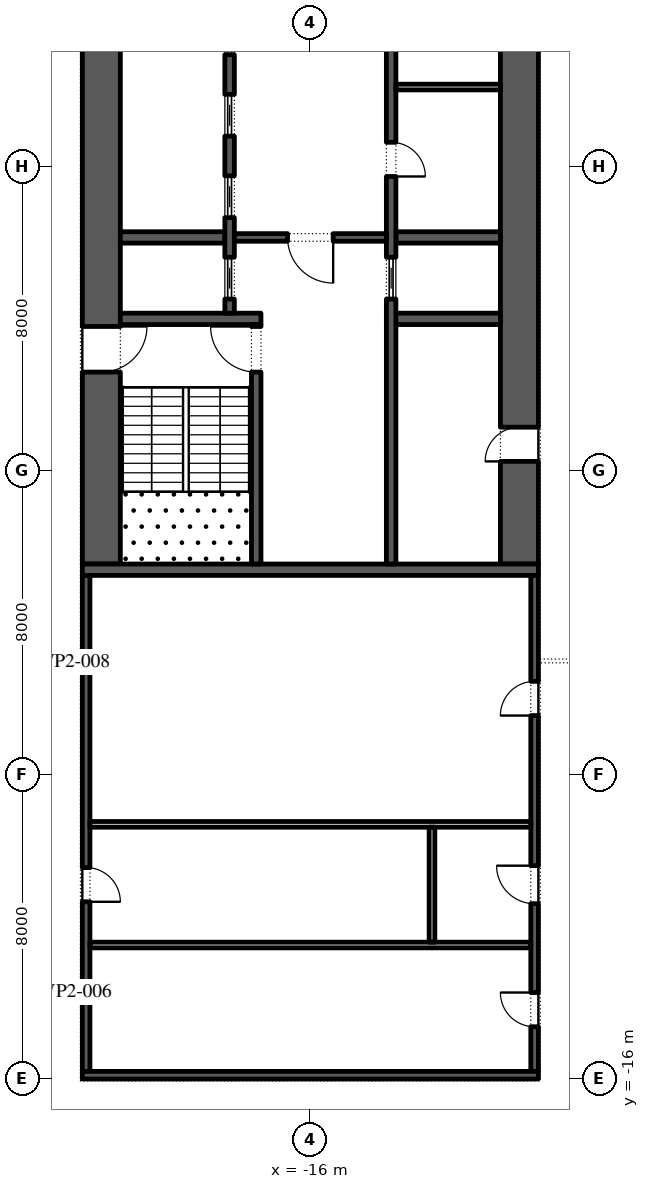
"""IFC4 building model, lengths in metres.
Left out: names, types, materials, properties, quantities, classifications, styles, units other than length and angle.
Written with IfcOpenShell. Run it as: python <this file> out.ifc"""

import sys

from ifc_helpers import new_model, si_unit, direction, frame, frame_2d, origin, place, context, subcontext, project, spatial, rectangle, extrude, element, fill, save


model = new_model("IFC4")
c1 = context("Model", 3, precision=1e-05, world=origin(), true_north=direction((0.0, 1.0)))
c2 = subcontext(c1, "Body", "Model", "MODEL_VIEW")
j1 = project(units=[si_unit("LENGTHUNIT", "METRE"), si_unit("PLANEANGLEUNIT", "RADIAN")], contexts=[c1])
p1 = place(None, origin())
s1 = spatial("IfcSite", under=j1, at=p1, CompositionType="ELEMENT")
p2 = place(p1, origin())
s2 = spatial("IfcBuilding", under=s1, at=p2, CompositionType="ELEMENT")
p3 = place(p2, frame((0.0, 0.0, 60.6)))
s3 = spatial("IfcBuildingStorey", under=s2, at=p3, CompositionType="ELEMENT", Elevation=60.6)
p4 = place(p3, frame((-21.5, -2.45, 0.0), z_axis=(0.0, 0.0, 1.0), x_axis=(0.0, 1.0, 0.0)))
e1 = element("IfcWall", 1, at=p4, inside=s3, PredefinedType="SHEAR", context=c2, shape_type="SweptSolid", body=[
    extrude(rectangle(XDim=27.9, YDim=1.0, at=frame_2d((13.95, 0.0))), origin(), (0.0, 0.0, 1.0), 4.0),
])
p5 = place(p4, frame((5.05, 0.0, 0.0)))
e2 = element("IfcOpeningElement", 2, at=p5, cuts=e1, PredefinedType="OPENING", context=c2, shape_type="SweptSolid", body=[
    extrude(rectangle(XDim=1.2, YDim=2.1, at=frame_2d((0.6, 1.05))), frame((0.0, 0.51, 0.0), z_axis=(0.0, -1.0, 0.0), x_axis=(1.0, 0.0, 0.0)), (0.0, 0.0, 1.0), 1.02),
])
p6 = place(p4, frame((21.65, 0.0, 0.0)))
e3 = element("IfcOpeningElement", 3, at=p6, cuts=e1, PredefinedType="OPENING", context=c2, shape_type="SweptSolid", body=[
    extrude(rectangle(XDim=1.2, YDim=2.1, at=frame_2d((0.6, 1.05))), frame((0.0, 0.51, 0.0), z_axis=(0.0, -1.0, 0.0), x_axis=(1.0, 0.0, 0.0)), (0.0, 0.0, 1.0), 1.02),
])
p7 = place(p3, frame((-10.5, -2.45, 0.0), z_axis=(0.0, 0.0, 1.0), x_axis=(0.0, 1.0, 0.0)))
e4 = element("IfcWall", 4, at=p7, inside=s3, PredefinedType="SHEAR", context=c2, shape_type="SweptSolid", body=[
    extrude(rectangle(XDim=27.9, YDim=1.0, at=frame_2d((13.95, 0.0))), origin(), (0.0, 0.0, 1.0), 4.0),
])
p8 = place(p7, frame((23.65, 0.0, 0.0)))
e5 = element("IfcOpeningElement", 5, at=p8, cuts=e4, PredefinedType="OPENING", context=c2, shape_type="SweptSolid", body=[
    extrude(rectangle(XDim=2.4, YDim=2.1, at=frame_2d((1.2, 1.05))), frame((0.0, 0.51, 0.0), z_axis=(0.0, -1.0, 0.0), x_axis=(1.0, 0.0, 0.0)), (0.0, 0.0, 1.0), 1.02),
])
p9 = place(p7, frame((2.7, 0.0, 0.0)))
e6 = element("IfcOpeningElement", 6, at=p9, cuts=e4, PredefinedType="OPENING", context=c2, shape_type="SweptSolid", body=[
    extrude(rectangle(XDim=0.9, YDim=2.1, at=frame_2d((0.45, 1.05))), frame((0.0, 0.51, 0.0), z_axis=(0.0, -1.0, 0.0), x_axis=(1.0, 0.0, 0.0)), (0.0, 0.0, 1.0), 1.02),
])
p10 = place(p3, frame((-22.0, -2.6, 0.0), z_axis=(0.0, 0.0, 1.0), x_axis=(1.0, 0.0, 0.0)))
e7 = element("IfcWall", 7, at=p10, inside=s3, PredefinedType="SHEAR", context=c2, shape_type="SweptSolid", body=[
    extrude(rectangle(XDim=12.0, YDim=0.3, at=frame_2d((6.0, 0.0))), origin(), (0.0, 0.0, 1.0), 4.0),
])
p11 = place(p3, frame((-21.0, 4.0, 0.0), z_axis=(0.0, 0.0, 1.0), x_axis=(1.0, 0.0, 0.0)))
e8 = element("IfcWall", 8, at=p11, inside=s3, PredefinedType="SHEAR", context=c2, shape_type="SweptSolid", body=[
    extrude(rectangle(XDim=3.7, YDim=0.3, at=frame_2d((1.85, 0.0))), origin(), (0.0, 0.0, 1.0), 4.0),
])
p12 = place(p3, frame((-17.425, -2.45, 0.0), z_axis=(0.0, 0.0, 1.0), x_axis=(0.0, 1.0, 0.0)))
e9 = element("IfcWall", 9, at=p12, inside=s3, PredefinedType="SHEAR", context=c2, shape_type="SweptSolid", body=[
    extrude(rectangle(XDim=6.3, YDim=0.25, at=frame_2d((3.15, 0.0))), origin(), (0.0, 0.0, 1.0), 4.0),
])
p13 = place(p12, frame((5.05, 0.0, 0.0)))
e10 = element("IfcOpeningElement", 10, at=p13, cuts=e9, PredefinedType="OPENING", context=c2, shape_type="SweptSolid", body=[
    extrude(rectangle(XDim=1.2, YDim=2.1, at=frame_2d((0.6, 1.05))), frame((0.0, 0.135, 0.0), z_axis=(0.0, -1.0, 0.0), x_axis=(1.0, 0.0, 0.0)), (0.0, 0.0, 1.0), 0.27),
])
p14 = place(p3, frame((-21.0, 6.143, 0.0), z_axis=(0.0, 0.0, 1.0), x_axis=(1.0, 0.0, 0.0)))
e11 = element("IfcWall", 11, at=p14, inside=s3, PredefinedType="SHEAR", context=c2, shape_type="SweptSolid", body=[
    extrude(rectangle(XDim=2.75, YDim=0.3, at=frame_2d((1.375, 0.0))), origin(), (0.0, 0.0, 1.0), 4.0),
])
p15 = place(p3, frame((-18.125, 4.15, 0.0), z_axis=(0.0, 0.0, 1.0), x_axis=(0.0, 1.0, 0.0)))
e12 = element("IfcWall", 12, at=p15, inside=s3, PredefinedType="SHEAR", context=c2, shape_type="SweptSolid", body=[
    extrude(rectangle(XDim=14.7, YDim=0.25, at=frame_2d((7.35, 0.0))), origin(), (0.0, 0.0, 1.0), 4.0),
])
p16 = place(p15, frame((0.371, 0.0, 0.0)))
e13 = element("IfcOpeningElement", 13, at=p16, cuts=e12, PredefinedType="OPENING", context=c2, shape_type="SweptSolid", body=[
    extrude(rectangle(XDim=1.1, YDim=2.1, at=frame_2d((0.55, 1.05))), frame((0.0, 0.135, 0.0), z_axis=(0.0, -1.0, 0.0), x_axis=(1.0, 0.0, 0.0)), (0.0, 0.0, 1.0), 0.27),
])
p17 = place(p15, frame((2.514, 0.0, 0.0)))
e14 = element("IfcOpeningElement", 14, at=p17, cuts=e12, PredefinedType="OPENING", context=c2, shape_type="SweptSolid", body=[
    extrude(rectangle(XDim=1.1, YDim=2.1, at=frame_2d((0.55, 1.05))), frame((0.0, 0.135, 0.0), z_axis=(0.0, -1.0, 0.0), x_axis=(1.0, 0.0, 0.0)), (0.0, 0.0, 1.0), 0.27),
])
p18 = place(p15, frame((4.657, 0.0, 0.0)))
e15 = element("IfcOpeningElement", 15, at=p18, cuts=e12, PredefinedType="OPENING", context=c2, shape_type="SweptSolid", body=[
    extrude(rectangle(XDim=1.1, YDim=2.1, at=frame_2d((0.55, 1.05))), frame((0.0, 0.135, 0.0), z_axis=(0.0, -1.0, 0.0), x_axis=(1.0, 0.0, 0.0)), (0.0, 0.0, 1.0), 0.27),
])
p19 = place(p15, frame((6.8, 0.0, 0.0)))
e16 = element("IfcOpeningElement", 16, at=p19, cuts=e12, PredefinedType="OPENING", context=c2, shape_type="SweptSolid", body=[
    extrude(rectangle(XDim=1.1, YDim=2.1, at=frame_2d((0.55, 1.05))), frame((0.0, 0.135, 0.0), z_axis=(0.0, -1.0, 0.0), x_axis=(1.0, 0.0, 0.0)), (0.0, 0.0, 1.0), 0.27),
])
p20 = place(p15, frame((8.943, 0.0, 0.0)))
e17 = element("IfcOpeningElement", 17, at=p20, cuts=e12, PredefinedType="OPENING", context=c2, shape_type="SweptSolid", body=[
    extrude(rectangle(XDim=1.1, YDim=2.1, at=frame_2d((0.55, 1.05))), frame((0.0, 0.135, 0.0), z_axis=(0.0, -1.0, 0.0), x_axis=(1.0, 0.0, 0.0)), (0.0, 0.0, 1.0), 0.27),
])
p21 = place(p15, frame((11.086, 0.0, 0.0)))
e18 = element("IfcOpeningElement", 18, at=p21, cuts=e12, PredefinedType="OPENING", context=c2, shape_type="SweptSolid", body=[
    extrude(rectangle(XDim=1.1, YDim=2.1, at=frame_2d((0.55, 1.05))), frame((0.0, 0.135, 0.0), z_axis=(0.0, -1.0, 0.0), x_axis=(1.0, 0.0, 0.0)), (0.0, 0.0, 1.0), 0.27),
])
p22 = place(p15, frame((13.229, 0.0, 0.0)))
e19 = element("IfcOpeningElement", 19, at=p22, cuts=e12, PredefinedType="OPENING", context=c2, shape_type="SweptSolid", body=[
    extrude(rectangle(XDim=1.1, YDim=2.1, at=frame_2d((0.55, 1.05))), frame((0.0, 0.135, 0.0), z_axis=(0.0, -1.0, 0.0), x_axis=(1.0, 0.0, 0.0)), (0.0, 0.0, 1.0), 0.27),
])
p23 = place(p3, frame((-14.0, 4.0, 0.0), z_axis=(0.0, 0.0, 1.0), x_axis=(1.0, 0.0, 0.0)))
e20 = element("IfcWall", 20, at=p23, inside=s3, PredefinedType="SHEAR", context=c2, shape_type="SweptSolid", body=[
    extrude(rectangle(XDim=3.0, YDim=0.3, at=frame_2d((1.5, 0.0))), origin(), (0.0, 0.0, 1.0), 4.0),
])
p24 = place(p3, frame((-13.75, 6.143, 0.0), z_axis=(0.0, 0.0, 1.0), x_axis=(1.0, 0.0, 0.0)))
e21 = element("IfcWall", 21, at=p24, inside=s3, PredefinedType="SHEAR", context=c2, shape_type="SweptSolid", body=[
    extrude(rectangle(XDim=2.75, YDim=0.3, at=frame_2d((1.375, 0.0))), origin(), (0.0, 0.0, 1.0), 4.0),
])
p25 = place(p3, frame((-13.875, -2.45, 0.0), z_axis=(0.0, 0.0, 1.0), x_axis=(0.0, 1.0, 0.0)))
e22 = element("IfcWall", 22, at=p25, inside=s3, PredefinedType="SHEAR", context=c2, shape_type="SweptSolid", body=[
    extrude(rectangle(XDim=21.3, YDim=0.25, at=frame_2d((10.65, 0.0))), origin(), (0.0, 0.0, 1.0), 4.0),
])
p26 = place(p25, frame((10.196, 0.0, 0.0)))
e23 = element("IfcOpeningElement", 23, at=p26, cuts=e22, PredefinedType="OPENING", context=c2, shape_type="SweptSolid", body=[
    extrude(rectangle(XDim=0.9, YDim=2.1, at=frame_2d((0.45, 1.05))), frame((0.0, 0.135, 0.0), z_axis=(0.0, -1.0, 0.0), x_axis=(1.0, 0.0, 0.0)), (0.0, 0.0, 1.0), 0.27),
])
p27 = place(p25, frame((16.475, 0.0, 0.0)))
e24 = element("IfcOpeningElement", 24, at=p27, cuts=e22, PredefinedType="OPENING", context=c2, shape_type="SweptSolid", body=[
    extrude(rectangle(XDim=0.9, YDim=2.1, at=frame_2d((0.45, 1.05))), frame((0.0, 0.135, 0.0), z_axis=(0.0, -1.0, 0.0), x_axis=(1.0, 0.0, 0.0)), (0.0, 0.0, 1.0), 0.27),
])
p28 = place(p25, frame((6.971, 0.0, 0.0)))
e25 = element("IfcOpeningElement", 25, at=p28, cuts=e22, PredefinedType="OPENING", context=c2, shape_type="SweptSolid", body=[
    extrude(rectangle(XDim=1.1, YDim=2.1, at=frame_2d((0.55, 1.05))), frame((0.0, 0.135, 0.0), z_axis=(0.0, -1.0, 0.0), x_axis=(1.0, 0.0, 0.0)), (0.0, 0.0, 1.0), 0.27),
])
p29 = place(p3, frame((-13.75, 10.1, 0.0), z_axis=(0.0, 0.0, 1.0), x_axis=(1.0, 0.0, 0.0)))
e26 = element("IfcWall", 26, at=p29, inside=s3, PredefinedType="PARTITIONING", context=c2, shape_type="SweptSolid", body=[
    extrude(rectangle(XDim=2.75, YDim=0.15, at=frame_2d((1.375, 0.0))), origin(), (0.0, 0.0, 1.0), 4.0),
])
p30 = place(p3, frame((-18.0, 6.143, 0.0), z_axis=(0.0, 0.0, 1.0), x_axis=(1.0, 0.0, 0.0)))
e27 = element("IfcWall", 27, at=p30, inside=s3, PredefinedType="SHEAR", context=c2, shape_type="SweptSolid", body=[
    extrude(rectangle(XDim=4.0, YDim=0.2, at=frame_2d((2.0, 0.0))), origin(), (0.0, 0.0, 1.0), 4.0),
])
p31 = place(p30, frame((1.4, 0.0, 0.0)))
e28 = element("IfcOpeningElement", 28, at=p31, cuts=e27, PredefinedType="OPENING", context=c2, shape_type="SweptSolid", body=[
    extrude(rectangle(XDim=1.2, YDim=2.1, at=frame_2d((0.6, 1.05))), frame((0.0, 0.11, 0.0), z_axis=(0.0, -1.0, 0.0), x_axis=(1.0, 0.0, 0.0)), (0.0, 0.0, 1.0), 0.22),
])
p32 = place(p3, frame((-21.9, -15.8, 0.0), z_axis=(0.0, 0.0, 1.0), x_axis=(0.0, 1.0, 0.0)))
e29 = element("IfcWall", 29, at=p32, inside=s3, PredefinedType="SHEAR", context=c2, shape_type="SweptSolid", body=[
    extrude(rectangle(XDim=13.05, YDim=0.2, at=frame_2d((6.525, 0.0))), origin(), (0.0, 0.0, 1.0), 4.0),
])
p33 = place(p32, frame((4.462, 0.0, 0.0)))
e30 = element("IfcOpeningElement", 30, at=p33, cuts=e29, PredefinedType="OPENING", context=c2, shape_type="SweptSolid", body=[
    extrude(rectangle(XDim=0.9, YDim=2.1, at=frame_2d((0.45, 1.05))), frame((0.0, 0.11, 0.0), z_axis=(0.0, -1.0, 0.0), x_axis=(1.0, 0.0, 0.0)), (0.0, 0.0, 1.0), 0.22),
])
p34 = place(p3, frame((-10.1, -15.8, 0.0), z_axis=(0.0, 0.0, 1.0), x_axis=(0.0, 1.0, 0.0)))
e31 = element("IfcWall", 31, at=p34, inside=s3, PredefinedType="SHEAR", context=c2, shape_type="SweptSolid", body=[
    extrude(rectangle(XDim=13.05, YDim=0.2, at=frame_2d((6.525, 0.0))), origin(), (0.0, 0.0, 1.0), 4.0),
])
p35 = place(p34, frame((1.175, 0.0, 0.0)))
e32 = element("IfcOpeningElement", 32, at=p35, cuts=e31, PredefinedType="OPENING", context=c2, shape_type="SweptSolid", body=[
    extrude(rectangle(XDim=0.9, YDim=2.1, at=frame_2d((0.45, 1.05))), frame((0.0, 0.11, 0.0), z_axis=(0.0, -1.0, 0.0), x_axis=(1.0, 0.0, 0.0)), (0.0, 0.0, 1.0), 0.22),
])
p36 = place(p34, frame((4.413, 0.0, 0.0)))
e33 = element("IfcOpeningElement", 33, at=p36, cuts=e31, PredefinedType="OPENING", context=c2, shape_type="SweptSolid", body=[
    extrude(rectangle(XDim=1.0, YDim=2.1, at=frame_2d((0.5, 1.05))), frame((0.0, 0.11, 0.0), z_axis=(0.0, -1.0, 0.0), x_axis=(1.0, 0.0, 0.0)), (0.0, 0.0, 1.0), 0.22),
])
p37 = place(p34, frame((9.363, 0.0, 0.0)))
e34 = element("IfcOpeningElement", 34, at=p37, cuts=e31, PredefinedType="OPENING", context=c2, shape_type="SweptSolid", body=[
    extrude(rectangle(XDim=0.9, YDim=2.1, at=frame_2d((0.45, 1.05))), frame((0.0, 0.11, 0.0), z_axis=(0.0, -1.0, 0.0), x_axis=(1.0, 0.0, 0.0)), (0.0, 0.0, 1.0), 0.22),
])
p38 = place(p3, frame((-22.0, -15.9, 0.0), z_axis=(0.0, 0.0, 1.0), x_axis=(1.0, 0.0, 0.0)))
e35 = element("IfcWall", 35, at=p38, inside=s3, PredefinedType="SHEAR", context=c2, shape_type="SweptSolid", body=[
    extrude(rectangle(XDim=12.0, YDim=0.2, at=frame_2d((6.0, 0.0))), origin(), (0.0, 0.0, 1.0), 4.0),
])
for number, where, z_axis, x_axis in (
    (36, (-21.8, -9.3, 0.0), (0.0, 0.0, 1.0), (1.0, 0.0, 0.0)),
    (37, (-21.8, -12.475, 0.0), (0.0, 0.0, 1.0), (1.0, 0.0, 0.0)),
):
    element("IfcWall", number, at=place(p3, frame(where, z_axis=z_axis, x_axis=x_axis)), inside=s3, PredefinedType="PARTITIONING", context=c2, shape_type="SweptSolid", body=[
        extrude(rectangle(XDim=11.6, YDim=0.15, at=frame_2d((5.8, 0.0))), origin(), (0.0, 0.0, 1.0), 4.0),
    ])
p39 = place(p3, frame((-12.8, -12.4, 0.0), z_axis=(0.0, 0.0, 1.0), x_axis=(0.0, 1.0, 0.0)))
e38 = element("IfcWall", 38, at=p39, inside=s3, PredefinedType="PARTITIONING", context=c2, shape_type="SweptSolid", body=[
    extrude(rectangle(XDim=3.025, YDim=0.15, at=frame_2d((1.512, 0.0))), origin(), (0.0, 0.0, 1.0), 4.0),
])
p40 = place(p16, origin())
e39 = element("IfcDoor", 39, at=p40, inside=s3, OperationType="SLIDING_TO_LEFT", PredefinedType="DOOR", context=c2, shape_type="SweptSolid", body=[
    extrude(rectangle(XDim=1.1, YDim=2.1, at=frame_2d((0.55, 1.05))), frame((0.0, 0.025, 0.0), z_axis=(0.0, -1.0, 0.0), x_axis=(1.0, 0.0, 0.0)), (0.0, 0.0, 1.0), 0.05),
])
fill(e13, e39)
p41 = place(p17, origin())
e40 = element("IfcDoor", 40, at=p41, inside=s3, OperationType="SLIDING_TO_LEFT", PredefinedType="DOOR", context=c2, shape_type="SweptSolid", body=[
    extrude(rectangle(XDim=1.1, YDim=2.1, at=frame_2d((0.55, 1.05))), frame((0.0, 0.025, 0.0), z_axis=(0.0, -1.0, 0.0), x_axis=(1.0, 0.0, 0.0)), (0.0, 0.0, 1.0), 0.05),
])
fill(e14, e40)
p42 = place(p18, origin())
e41 = element("IfcDoor", 41, at=p42, inside=s3, OperationType="SLIDING_TO_LEFT", PredefinedType="DOOR", context=c2, shape_type="SweptSolid", body=[
    extrude(rectangle(XDim=1.1, YDim=2.1, at=frame_2d((0.55, 1.05))), frame((0.0, 0.025, 0.0), z_axis=(0.0, -1.0, 0.0), x_axis=(1.0, 0.0, 0.0)), (0.0, 0.0, 1.0), 0.05),
])
fill(e15, e41)
p43 = place(p19, origin())
e42 = element("IfcDoor", 42, at=p43, inside=s3, OperationType="SLIDING_TO_LEFT", PredefinedType="DOOR", context=c2, shape_type="SweptSolid", body=[
    extrude(rectangle(XDim=1.1, YDim=2.1, at=frame_2d((0.55, 1.05))), frame((0.0, 0.025, 0.0), z_axis=(0.0, -1.0, 0.0), x_axis=(1.0, 0.0, 0.0)), (0.0, 0.0, 1.0), 0.05),
])
fill(e16, e42)
p44 = place(p26, frame((0.9, -0.2, 0.0), z_axis=(0.0, 0.0, 1.0), x_axis=(-1.0, 0.0, 0.0)))
e43 = element("IfcDoor", 43, at=p44, inside=s3, OperationType="SINGLE_SWING_LEFT", PredefinedType="DOOR", context=c2, shape_type="SweptSolid", body=[
    extrude(rectangle(XDim=0.9, YDim=2.1, at=frame_2d((0.45, 1.05))), frame((0.0, -0.075, 0.0), z_axis=(0.0, -1.0, 0.0), x_axis=(1.0, 0.0, 0.0)), (0.0, 0.0, 1.0), 0.05),
])
fill(e23, e43)
p45 = place(p28, origin())
e44 = element("IfcDoor", 44, at=p45, inside=s3, OperationType="SLIDING_TO_LEFT", PredefinedType="DOOR", context=c2, shape_type="SweptSolid", body=[
    extrude(rectangle(XDim=1.1, YDim=2.1, at=frame_2d((0.55, 1.05))), frame((0.0, 0.025, 0.0), z_axis=(0.0, -1.0, 0.0), x_axis=(1.0, 0.0, 0.0)), (0.0, 0.0, 1.0), 0.05),
])
fill(e25, e44)
p46 = place(p31, frame((1.2, 0.0, 0.0), z_axis=(0.0, 0.0, 1.0), x_axis=(-1.0, 0.0, 0.0)))
e45 = element("IfcDoor", 45, at=p46, inside=s3, OperationType="SINGLE_SWING_RIGHT", PredefinedType="DOOR", context=c2, shape_type="SweptSolid", body=[
    extrude(rectangle(XDim=1.2, YDim=2.1, at=frame_2d((0.6, 1.05))), frame((0.0, 0.025, 0.0), z_axis=(0.0, -1.0, 0.0), x_axis=(1.0, 0.0, 0.0)), (0.0, 0.0, 1.0), 0.05),
])
fill(e28, e45)
p47 = place(p13, origin())
e46 = element("IfcDoor", 46, at=p47, inside=s3, OperationType="SINGLE_SWING_LEFT", PredefinedType="DOOR", context=c2, shape_type="SweptSolid", body=[
    extrude(rectangle(XDim=1.2, YDim=2.1, at=frame_2d((0.6, 1.05))), frame((0.0, 0.025, 0.0), z_axis=(0.0, -1.0, 0.0), x_axis=(1.0, 0.0, 0.0)), (0.0, 0.0, 1.0), 0.05),
])
fill(e10, e46)
p48 = place(p5, frame((1.2, 0.0, 0.0), z_axis=(0.0, 0.0, 1.0), x_axis=(-1.0, 0.0, 0.0)))
e47 = element("IfcDoor", 47, at=p48, inside=s3, OperationType="SINGLE_SWING_RIGHT", PredefinedType="DOOR", context=c2, shape_type="SweptSolid", body=[
    extrude(rectangle(XDim=1.2, YDim=2.1, at=frame_2d((0.6, 1.05))), frame((0.0, 0.025, 0.0), z_axis=(0.0, -1.0, 0.0), x_axis=(1.0, 0.0, 0.0)), (0.0, 0.0, 1.0), 0.05),
])
fill(e2, e47)
p49 = place(p9, origin())
e48 = element("IfcDoor", 48, at=p49, inside=s3, OperationType="SINGLE_SWING_RIGHT", PredefinedType="DOOR", context=c2, shape_type="SweptSolid", body=[
    extrude(rectangle(XDim=0.9, YDim=2.1, at=frame_2d((0.45, 1.05))), frame((0.0, 0.5, 0.0), z_axis=(0.0, -1.0, 0.0), x_axis=(1.0, 0.0, 0.0)), (0.0, 0.0, 1.0), 0.05),
])
fill(e6, e48)
p50 = place(p35, origin())
e49 = element("IfcDoor", 49, at=p50, inside=s3, OperationType="SINGLE_SWING_LEFT", PredefinedType="DOOR", context=c2, shape_type="SweptSolid", body=[
    extrude(rectangle(XDim=0.9, YDim=2.1, at=frame_2d((0.45, 1.05))), frame((0.0, 0.1, 0.0), z_axis=(0.0, -1.0, 0.0), x_axis=(1.0, 0.0, 0.0)), (0.0, 0.0, 1.0), 0.05),
])
fill(e32, e49)
p51 = place(p36, origin())
e50 = element("IfcDoor", 50, at=p51, inside=s3, OperationType="SINGLE_SWING_LEFT", PredefinedType="DOOR", context=c2, shape_type="SweptSolid", body=[
    extrude(rectangle(XDim=1.0, YDim=2.1, at=frame_2d((0.5, 1.05))), frame((0.0, 0.1, 0.0), z_axis=(0.0, -1.0, 0.0), x_axis=(1.0, 0.0, 0.0)), (0.0, 0.0, 1.0), 0.05),
])
fill(e33, e50)
p52 = place(p33, frame((0.9, -0.15, 0.0), z_axis=(0.0, 0.0, 1.0), x_axis=(-1.0, 0.0, 0.0)))
e51 = element("IfcDoor", 51, at=p52, inside=s3, OperationType="SINGLE_SWING_LEFT", PredefinedType="DOOR", context=c2, shape_type="SweptSolid", body=[
    extrude(rectangle(XDim=0.9, YDim=2.1, at=frame_2d((0.45, 1.05))), frame((0.0, -0.05, 0.0), z_axis=(0.0, -1.0, 0.0), x_axis=(1.0, 0.0, 0.0)), (0.0, 0.0, 1.0), 0.05),
])
fill(e30, e51)
p53 = place(p37, origin())
e52 = element("IfcDoor", 52, at=p53, inside=s3, OperationType="SINGLE_SWING_RIGHT", PredefinedType="DOOR", context=c2, shape_type="SweptSolid", body=[
    extrude(rectangle(XDim=0.9, YDim=2.1, at=frame_2d((0.45, 1.05))), frame((0.0, 0.1, 0.0), z_axis=(0.0, -1.0, 0.0), x_axis=(1.0, 0.0, 0.0)), (0.0, 0.0, 1.0), 0.05),
])
fill(e34, e52)
save(model, sys.argv[1])
